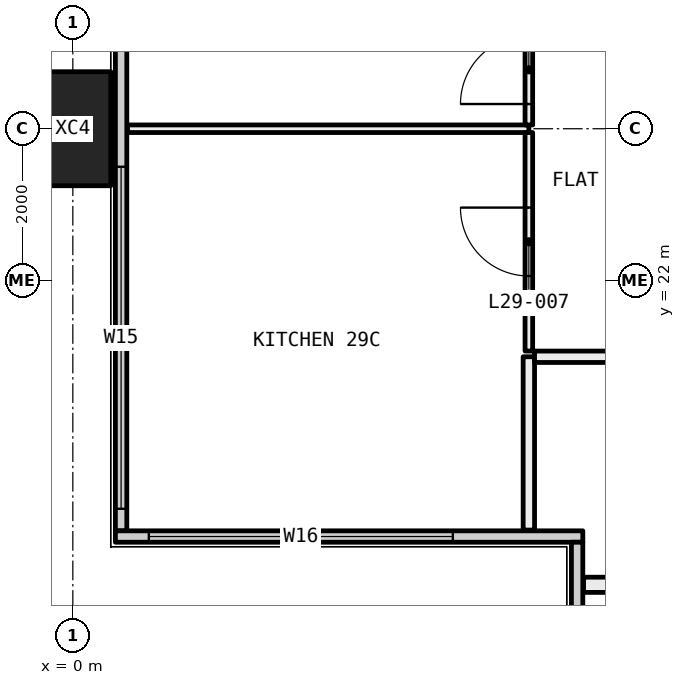
"""IFC4 building model, lengths in metres.
Left out: names, types, materials, properties, quantities, classifications, styles, units other than length and angle.
Written with IfcOpenShell. Run it as: python <this file> out.ifc"""

import sys

from ifc_helpers import new_model, si_unit, direction, frame, frame_2d, origin, origin_2d, place, context, subcontext, project, spatial, rectangle, hollow_rectangle, extrude, element, fill, save


model = new_model("IFC4")
c1 = context("Model", 3, precision=1e-05, world=origin(), true_north=direction((0.0, 1.0)))
c2 = subcontext(c1, "Body", "Model", "MODEL_VIEW")
j1 = project(units=[si_unit("LENGTHUNIT", "METRE"), si_unit("PLANEANGLEUNIT", "RADIAN")], contexts=[c1])
p1 = place(None, origin())
s1 = spatial("IfcSite", under=j1, at=p1, CompositionType="ELEMENT")
p2 = place(p1, origin())
s2 = spatial("IfcBuilding", under=s1, at=p2, CompositionType="ELEMENT")
p3 = place(p2, frame((0.0, 0.0, 113.85)))
s3 = spatial("IfcBuildingStorey", under=s2, at=p3, CompositionType="ELEMENT", Elevation=113.85)
p4 = place(p3, frame((0.0, 24.0, -0.4), z_axis=(0.0, 0.0, 1.0), x_axis=(0.0, 1.0, 0.0)))
e1 = element("IfcColumn", 1, at=p4, inside=s3, PredefinedType="COLUMN", context=c2, shape_type="SweptSolid", body=[
    extrude(hollow_rectangle(XDim=1.5, YDim=1.0, WallThickness=0.06, at=origin_2d()), origin(), (0.0, 0.0, 1.0), 3.45),
])
p5 = place(p3, frame((0.635, 18.71, 0.0), z_axis=(0.0, 0.0, 1.0), x_axis=(0.0, 1.0, 0.0)))
e2 = element("IfcWall", 2, at=p5, inside=s3, PredefinedType="ELEMENTEDWALL", context=c2, shape_type="SweptSolid", body=[
    extrude(rectangle(XDim=22.58, YDim=0.15, at=frame_2d((11.29, 0.0))), origin(), (0.0, 0.0, 1.0), 3.05),
])
p6 = place(p5, frame((0.29, 0.0, 0.45)))
e3 = element("IfcOpeningElement", 3, at=p6, cuts=e2, PredefinedType="OPENING", context=c2, shape_type="SweptSolid", body=[
    extrude(rectangle(XDim=4.5, YDim=2.55, at=frame_2d((2.25, 1.275))), frame((0.0, 0.085, 0.0), z_axis=(0.0, -1.0, 0.0), x_axis=(1.0, 0.0, 0.0)), (0.0, 0.0, 1.0), 0.17),
])
p7 = place(p5, frame((8.04, 0.0, 0.45)))
e4 = element("IfcOpeningElement", 4, at=p7, cuts=e2, PredefinedType="OPENING", context=c2, shape_type="SweptSolid", body=[
    extrude(rectangle(XDim=2.75, YDim=2.55, at=frame_2d((1.375, 1.275))), frame((0.0, 0.085, 0.0), z_axis=(0.0, -1.0, 0.0), x_axis=(1.0, 0.0, 0.0)), (0.0, 0.0, 1.0), 0.17),
])
p8 = place(p5, frame((11.79, 0.0, 0.45)))
e5 = element("IfcOpeningElement", 5, at=p8, cuts=e2, PredefinedType="OPENING", context=c2, shape_type="SweptSolid", body=[
    extrude(rectangle(XDim=2.0, YDim=2.55, at=frame_2d((1.0, 1.275))), frame((0.0, 0.085, 0.0), z_axis=(0.0, -1.0, 0.0), x_axis=(1.0, 0.0, 0.0)), (0.0, 0.0, 1.0), 0.17),
])
p9 = place(p5, frame((17.79, 0.0, 0.45)))
e6 = element("IfcOpeningElement", 6, at=p9, cuts=e2, PredefinedType="OPENING", context=c2, shape_type="SweptSolid", body=[
    extrude(rectangle(XDim=4.5, YDim=2.55, at=frame_2d((2.25, 1.275))), frame((0.0, 0.085, 0.0), z_axis=(0.0, -1.0, 0.0), x_axis=(1.0, 0.0, 0.0)), (0.0, 0.0, 1.0), 0.17),
])
p10 = place(p3, frame((0.56, 18.635, 0.0), z_axis=(0.0, 0.0, 1.0), x_axis=(1.0, 0.0, 0.0)))
e7 = element("IfcWall", 7, at=p10, inside=s3, PredefinedType="ELEMENTEDWALL", context=c2, shape_type="SweptSolid", body=[
    extrude(rectangle(XDim=6.15, YDim=0.15, at=frame_2d((3.075, 0.0))), origin(), (0.0, 0.0, 1.0), 3.05),
])
p11 = place(p10, frame((0.44, 0.0, 0.45)))
e8 = element("IfcOpeningElement", 8, at=p11, cuts=e7, PredefinedType="OPENING", context=c2, shape_type="SweptSolid", body=[
    extrude(rectangle(XDim=4.0, YDim=2.55, at=frame_2d((2.0, 1.275))), frame((0.0, 0.085, 0.0), z_axis=(0.0, -1.0, 0.0), x_axis=(1.0, 0.0, 0.0)), (0.0, 0.0, 1.0), 0.17),
])
p12 = place(p3, frame((6.635, 12.71, 0.0), z_axis=(0.0, 0.0, 1.0), x_axis=(0.0, 1.0, 0.0)))
e9 = element("IfcWall", 9, at=p12, inside=s3, PredefinedType="ELEMENTEDWALL", context=c2, shape_type="SweptSolid", body=[
    extrude(rectangle(XDim=5.85, YDim=0.15, at=frame_2d((2.925, 0.0))), origin(), (0.0, 0.0, 1.0), 3.05),
])
p13 = place(p12, frame((0.29, 0.0, 0.45)))
e10 = element("IfcOpeningElement", 10, at=p13, cuts=e9, PredefinedType="OPENING", context=c2, shape_type="SweptSolid", body=[
    extrude(rectangle(XDim=4.0, YDim=2.55, at=frame_2d((2.0, 1.275))), frame((0.0, 0.085, 0.0), z_axis=(0.0, -1.0, 0.0), x_axis=(1.0, 0.0, 0.0)), (0.0, 0.0, 1.0), 0.17),
])
p14 = place(p3, frame((10.1, 18.0, 0.0), z_axis=(0.0, 0.0, 1.0), x_axis=(-1.0, 0.0, 0.0)))
e11 = element("IfcWall", 11, at=p14, inside=s3, PredefinedType="PARTITIONING", context=c2, shape_type="SweptSolid", body=[
    extrude(rectangle(XDim=3.38, YDim=0.2, at=frame_2d((1.69, 0.0))), origin(), (0.0, 0.0, 1.0), 3.05),
])
p15 = place(p3, frame((6.0, 24.0, 0.0), z_axis=(0.0, 0.0, 1.0), x_axis=(-1.0, 0.0, 0.0)))
e12 = element("IfcWall", 12, at=p15, inside=s3, PredefinedType="PARTITIONING", context=c2, shape_type="SweptSolid", body=[
    extrude(rectangle(XDim=5.28, YDim=0.1, at=frame_2d((2.64, 0.0))), origin(), (0.0, 0.0, 1.0), 2.45),
])
p16 = place(p3, frame((6.0, 18.72, 0.0), z_axis=(0.0, 0.0, 1.0), x_axis=(0.0, 1.0, 0.0)))
e13 = element("IfcWall", 13, at=p16, inside=s3, PredefinedType="PARTITIONING", context=c2, shape_type="SweptSolid", body=[
    extrude(rectangle(XDim=2.28, YDim=0.15, at=frame_2d((1.14, 0.0))), origin(), (0.0, 0.0, 1.0), 3.05),
])
p17 = place(p3, frame((6.0, 21.075, 0.0), z_axis=(0.0, 0.0, 1.0), x_axis=(0.0, 1.0, 0.0)))
e14 = element("IfcWall", 14, at=p17, inside=s3, PredefinedType="PARTITIONING", context=c2, shape_type="SweptSolid", body=[
    extrude(rectangle(XDim=2.875, YDim=0.1, at=frame_2d((1.438, 0.0))), origin(), (0.0, 0.0, 1.0), 2.45),
])
p18 = place(p17, frame((0.988, 0.0, 0.0)))
e15 = element("IfcOpeningElement", 15, at=p18, cuts=e14, PredefinedType="OPENING", context=c2, shape_type="SweptSolid", body=[
    extrude(rectangle(XDim=0.9, YDim=2.1, at=frame_2d((0.45, 1.05))), frame((0.0, 0.06, 0.0), z_axis=(0.0, -1.0, 0.0), x_axis=(1.0, 0.0, 0.0)), (0.0, 0.0, 1.0), 0.12),
])
p19 = place(p3, frame((6.0, 24.05, 0.0), z_axis=(0.0, 0.0, 1.0), x_axis=(0.0, 1.0, 0.0)))
e16 = element("IfcWall", 16, at=p19, inside=s3, PredefinedType="PARTITIONING", context=c2, shape_type="SweptSolid", body=[
    extrude(rectangle(XDim=1.45, YDim=0.1, at=frame_2d((0.725, 0.0))), origin(), (0.0, 0.0, 1.0), 2.45),
])
p20 = place(p19, frame((0.275, 0.0, 0.0)))
e17 = element("IfcOpeningElement", 17, at=p20, cuts=e16, PredefinedType="OPENING", context=c2, shape_type="SweptSolid", body=[
    extrude(rectangle(XDim=0.9, YDim=2.1, at=frame_2d((0.45, 1.05))), frame((0.0, 0.06, 0.0), z_axis=(0.0, -1.0, 0.0), x_axis=(1.0, 0.0, 0.0)), (0.0, 0.0, 1.0), 0.12),
])
p21 = place(p3, frame((10.0, 21.0, 0.0), z_axis=(0.0, 0.0, 1.0), x_axis=(-1.0, 0.0, 0.0)))
e18 = element("IfcWall", 18, at=p21, inside=s3, PredefinedType="PARTITIONING", context=c2, shape_type="SweptSolid", body=[
    extrude(rectangle(XDim=3.925, YDim=0.15, at=frame_2d((1.962, 0.0))), origin(), (0.0, 0.0, 1.0), 3.05),
])
p22 = place(p21, frame((1.512, 0.0, 0.0)))
e19 = element("IfcOpeningElement", 19, at=p22, cuts=e18, PredefinedType="OPENING", context=c2, shape_type="SweptSolid", body=[
    extrude(rectangle(XDim=0.9, YDim=2.1, at=frame_2d((0.45, 1.05))), frame((0.0, 0.085, 0.0), z_axis=(0.0, -1.0, 0.0), x_axis=(1.0, 0.0, 0.0)), (0.0, 0.0, 1.0), 0.17),
])
p23 = place(p6, origin())
e20 = element("IfcWindow", 20, at=p23, inside=s3, PartitioningType="SINGLE_PANEL", PredefinedType="WINDOW", context=c2, shape_type="SweptSolid", body=[
    extrude(rectangle(XDim=4.5, YDim=2.55, at=frame_2d((2.25, 1.275))), frame((0.0, 0.03, 0.0), z_axis=(0.0, -1.0, 0.0), x_axis=(1.0, 0.0, 0.0)), (0.0, 0.0, 1.0), 0.06),
])
fill(e3, e20)
p24 = place(p11, origin())
e21 = element("IfcWindow", 21, at=p24, inside=s3, PartitioningType="SINGLE_PANEL", PredefinedType="WINDOW", context=c2, shape_type="SweptSolid", body=[
    extrude(rectangle(XDim=4.0, YDim=2.55, at=frame_2d((2.0, 1.275))), frame((0.0, 0.03, 0.0), z_axis=(0.0, -1.0, 0.0), x_axis=(1.0, 0.0, 0.0)), (0.0, 0.0, 1.0), 0.06),
])
fill(e8, e21)
p25 = place(p18, origin())
e22 = element("IfcDoor", 22, at=p25, inside=s3, OperationType="SINGLE_SWING_LEFT", PredefinedType="DOOR", context=c2, shape_type="SweptSolid", body=[
    extrude(rectangle(XDim=0.9, YDim=2.1, at=frame_2d((0.45, 1.05))), frame((0.0, 0.025, 0.0), z_axis=(0.0, -1.0, 0.0), x_axis=(1.0, 0.0, 0.0)), (0.0, 0.0, 1.0), 0.05),
])
fill(e15, e22)
p26 = place(p20, origin())
e23 = element("IfcDoor", 23, at=p26, inside=s3, OperationType="SINGLE_SWING_RIGHT", PredefinedType="DOOR", context=c2, shape_type="SweptSolid", body=[
    extrude(rectangle(XDim=0.9, YDim=2.1, at=frame_2d((0.45, 1.05))), frame((0.0, 0.025, 0.0), z_axis=(0.0, -1.0, 0.0), x_axis=(1.0, 0.0, 0.0)), (0.0, 0.0, 1.0), 0.05),
])
fill(e17, e23)
save(model, sys.argv[1])
